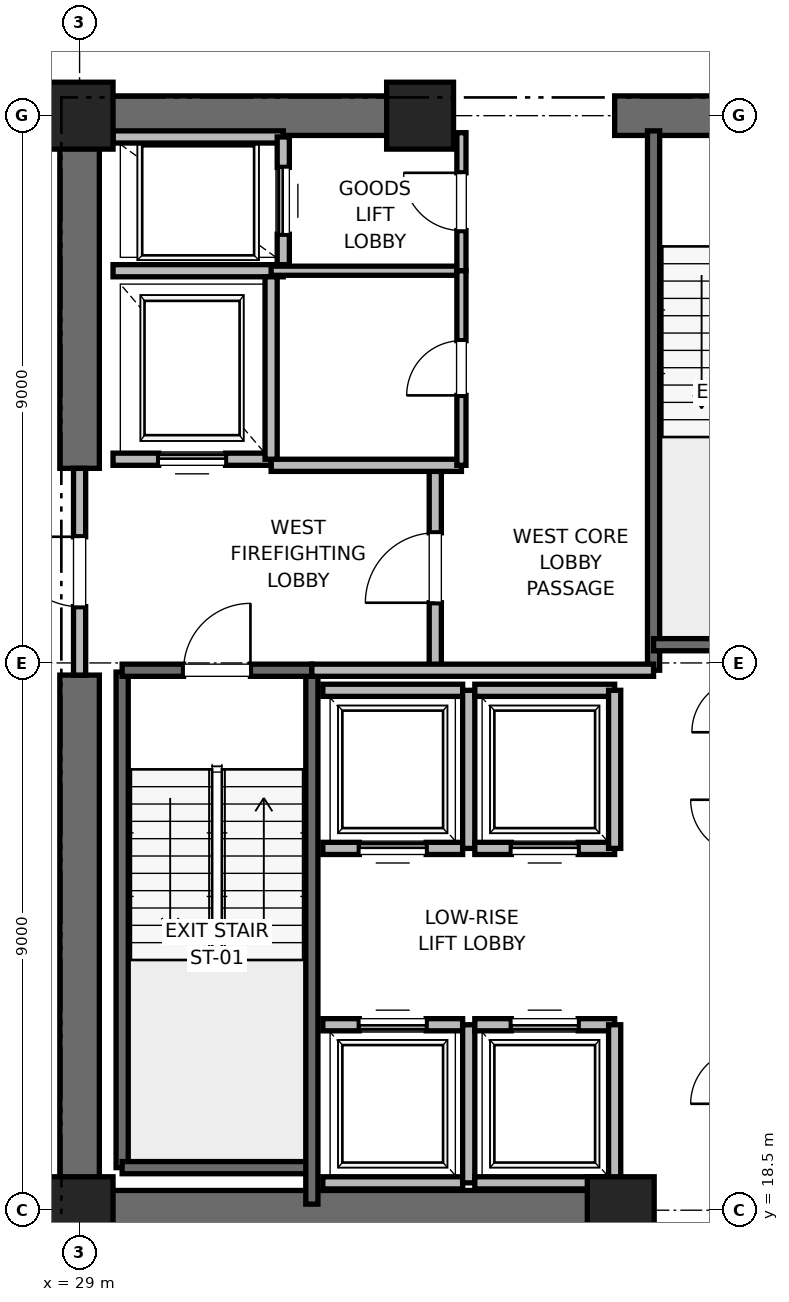
"""IFC4 building model, lengths in metres.
Left out: names, types, materials, properties, quantities, classifications, styles, units other than length and angle.
Written with IfcOpenShell. Run it as: python <this file> out.ifc"""

import sys

from ifc_helpers import new_model, si_unit, direction, frame, frame_2d, origin, origin_2d, place, context, subcontext, project, spatial, rectangle, extrude, element, fill, save


model = new_model("IFC4")
c1 = context("Model", 3, precision=1e-05, world=origin(), true_north=direction((0.0, 1.0)))
c2 = subcontext(c1, "Body", "Model", "MODEL_VIEW")
j1 = project(units=[si_unit("LENGTHUNIT", "METRE"), si_unit("PLANEANGLEUNIT", "RADIAN")], contexts=[c1])
p1 = place(None, origin())
s1 = spatial("IfcSite", under=j1, at=p1, CompositionType="ELEMENT")
p2 = place(p1, origin())
s2 = spatial("IfcBuilding", under=s1, at=p2, CompositionType="ELEMENT")
p3 = place(p2, frame((0.0, 0.0, 91.6)))
s3 = spatial("IfcBuildingStorey", under=s2, at=p3, CompositionType="ELEMENT", Elevation=91.6)
for number, where, z_axis, x_axis in (
    (1, (29.0, 18.5, 0.0), (0.0, 0.0, 1.0), (1.0, 0.0, 0.0)),
    (2, (29.0, 36.5, 0.0), (0.0, 0.0, 1.0), (1.0, 0.0, 0.0)),
    (3, (37.9, 18.5, 0.0), (0.0, 0.0, 1.0), (1.0, 0.0, 0.0)),
    (4, (34.6, 36.5, 0.0), (0.0, 0.0, 1.0), (1.0, 0.0, 0.0)),
):
    element("IfcColumn", number, at=place(p3, frame(where, z_axis=z_axis, x_axis=x_axis)), inside=s3, PredefinedType="PILASTER", context=c2, shape_type="SweptSolid", body=[
        extrude(rectangle(XDim=1.1, YDim=1.1, at=origin_2d()), origin(), (0.0, 0.0, 1.0), 4.0),
    ])
p4 = place(p3, frame((29.0, 18.5, 0.0), z_axis=(0.0, 0.0, 1.0), x_axis=(1.0, 0.0, 0.0)))
e5 = element("IfcWall", 5, at=p4, inside=s3, PredefinedType="SHEAR", context=c2, shape_type="SweptSolid", body=[
    extrude(rectangle(XDim=9.2, YDim=0.65, at=frame_2d((4.6, 0.0))), origin(), (0.0, 0.0, 1.0), 3.76),
])
p5 = place(p3, frame((29.0, 36.5, 0.0), z_axis=(0.0, 0.0, 1.0), x_axis=(1.0, 0.0, 0.0)))
e6 = element("IfcWall", 6, at=p5, inside=s3, PredefinedType="SHEAR", context=c2, shape_type="SweptSolid", body=[
    extrude(rectangle(XDim=5.8, YDim=0.65, at=frame_2d((2.9, 0.0))), origin(), (0.0, 0.0, 1.0), 3.76),
])
p6 = place(p3, frame((37.8, 36.5, 0.0), z_axis=(0.0, 0.0, 1.0), x_axis=(1.0, 0.0, 0.0)))
e7 = element("IfcWall", 7, at=p6, inside=s3, PredefinedType="SHEAR", context=c2, shape_type="SweptSolid", body=[
    extrude(rectangle(XDim=4.4, YDim=0.65, at=frame_2d((2.2, 0.0))), origin(), (0.0, 0.0, 1.0), 3.76),
])
p7 = place(p6, frame((1.65, 0.0, 0.0)))
e8 = element("IfcOpeningElement", 8, at=p7, cuts=e7, PredefinedType="OPENING", context=c2, shape_type="SweptSolid", body=[
    extrude(rectangle(XDim=1.1, YDim=2.15, at=frame_2d((0.55, 1.075))), frame((0.0, 0.325, 0.0), z_axis=(0.0, -1.0, 0.0), x_axis=(1.0, 0.0, 0.0)), (0.0, 0.0, 1.0), 0.65),
])
p8 = place(p3, frame((29.0, 18.5, 0.0), z_axis=(0.0, 0.0, 1.0), x_axis=(0.0, 1.0, 0.0)))
e9 = element("IfcWall", 9, at=p8, inside=s3, PredefinedType="SHEAR", context=c2, shape_type="SweptSolid", body=[
    extrude(rectangle(XDim=8.8, YDim=0.65, at=frame_2d((4.4, 0.0))), origin(), (0.0, 0.0, 1.0), 3.76),
])
p9 = place(p3, frame((29.0, 30.7, 0.0), z_axis=(0.0, 0.0, 1.0), x_axis=(0.0, 1.0, 0.0)))
e10 = element("IfcWall", 10, at=p9, inside=s3, PredefinedType="SHEAR", context=c2, shape_type="SweptSolid", body=[
    extrude(rectangle(XDim=5.8, YDim=0.65, at=frame_2d((2.9, 0.0))), origin(), (0.0, 0.0, 1.0), 3.76),
])
p10 = place(p3, frame((29.7, 19.2, 0.0), z_axis=(0.0, 0.0, 1.0), x_axis=(0.0, 1.0, 0.0)))
e11 = element("IfcWall", 11, at=p10, inside=s3, PredefinedType="SOLIDWALL", context=c2, shape_type="SweptSolid", body=[
    extrude(rectangle(XDim=8.15, YDim=0.2, at=frame_2d((4.075, 0.0))), origin(), (0.0, 0.0, 1.0), 3.76),
])
p11 = place(p3, frame((29.7, 19.2, 0.0), z_axis=(0.0, 0.0, 1.0), x_axis=(1.0, 0.0, 0.0)))
e12 = element("IfcWall", 12, at=p11, inside=s3, PredefinedType="SOLIDWALL", context=c2, shape_type="SweptSolid", body=[
    extrude(rectangle(XDim=3.12, YDim=0.2, at=frame_2d((1.56, 0.0))), origin(), (0.0, 0.0, 1.0), 3.76),
])
p12 = place(p3, frame((32.82, 18.6, 0.0), z_axis=(0.0, 0.0, 1.0), x_axis=(0.0, 1.0, 0.0)))
e13 = element("IfcWall", 13, at=p12, inside=s3, PredefinedType="SOLIDWALL", context=c2, shape_type="SweptSolid", body=[
    extrude(rectangle(XDim=8.78, YDim=0.2, at=frame_2d((4.39, 0.0))), origin(), (0.0, 0.0, 1.0), 3.76),
])
p13 = place(p3, frame((29.7, 27.38, 0.0), z_axis=(0.0, 0.0, 1.0), x_axis=(1.0, 0.0, 0.0)))
e14 = element("IfcWall", 14, at=p13, inside=s3, PredefinedType="SOLIDWALL", context=c2, shape_type="SweptSolid", body=[
    extrude(rectangle(XDim=3.12, YDim=0.2, at=frame_2d((1.56, 0.0))), origin(), (0.0, 0.0, 1.0), 3.76),
])
p14 = place(p13, frame((1.01, 0.0, 0.0)))
e15 = element("IfcOpeningElement", 15, at=p14, cuts=e14, PredefinedType="OPENING", context=c2, shape_type="SweptSolid", body=[
    extrude(rectangle(XDim=1.1, YDim=2.15, at=frame_2d((0.55, 1.075))), frame((0.0, 0.1, 0.0), z_axis=(0.0, -1.0, 0.0), x_axis=(1.0, 0.0, 0.0)), (0.0, 0.0, 1.0), 0.2),
])
p15 = place(p3, frame((38.44, 27.38, 0.0), z_axis=(0.0, 0.0, 1.0), x_axis=(0.0, 1.0, 0.0)))
e16 = element("IfcWall", 16, at=p15, inside=s3, PredefinedType="SOLIDWALL", context=c2, shape_type="SweptSolid", body=[
    extrude(rectangle(XDim=8.87, YDim=0.2, at=frame_2d((4.435, 0.0))), origin(), (0.0, 0.0, 1.0), 3.76),
])
p16 = place(p3, frame((38.44, 27.8, 0.0), z_axis=(0.0, 0.0, 1.0), x_axis=(1.0, 0.0, 0.0)))
e17 = element("IfcWall", 17, at=p16, inside=s3, PredefinedType="SOLIDWALL", context=c2, shape_type="SweptSolid", body=[
    extrude(rectangle(XDim=3.32, YDim=0.2, at=frame_2d((1.66, 0.0))), origin(), (0.0, 0.0, 1.0), 3.76),
])
p17 = place(p3, frame((34.85, 27.38, 0.0), z_axis=(0.0, 0.0, 1.0), x_axis=(0.0, 1.0, 0.0)))
e18 = element("IfcWall", 18, at=p17, inside=s3, PredefinedType="PARTITIONING", context=c2, shape_type="SweptSolid", body=[
    extrude(rectangle(XDim=3.37, YDim=0.2, at=frame_2d((1.685, 0.0))), origin(), (0.0, 0.0, 1.0), 3.76),
])
p18 = place(p17, frame((1.11, 0.0, 0.0)))
e19 = element("IfcOpeningElement", 19, at=p18, cuts=e18, PredefinedType="OPENING", context=c2, shape_type="SweptSolid", body=[
    extrude(rectangle(XDim=1.15, YDim=2.2, at=frame_2d((0.575, 1.1))), frame((0.0, 0.1, 0.0), z_axis=(0.0, -1.0, 0.0), x_axis=(1.0, 0.0, 0.0)), (0.0, 0.0, 1.0), 0.2),
])
p19 = place(p3, frame((29.0, 27.3, 0.0), z_axis=(0.0, 0.0, 1.0), x_axis=(0.0, 1.0, 0.0)))
e20 = element("IfcWall", 20, at=p19, inside=s3, PredefinedType="PARTITIONING", context=c2, shape_type="SweptSolid", body=[
    extrude(rectangle(XDim=3.4, YDim=0.2, at=frame_2d((1.7, 0.0))), origin(), (0.0, 0.0, 1.0), 2.54),
])
p20 = place(p19, frame((1.125, 0.0, 0.0)))
e21 = element("IfcOpeningElement", 21, at=p20, cuts=e20, PredefinedType="OPENING", context=c2, shape_type="SweptSolid", body=[
    extrude(rectangle(XDim=1.15, YDim=2.2, at=frame_2d((0.575, 1.1))), frame((0.0, 0.1, 0.0), z_axis=(0.0, -1.0, 0.0), x_axis=(1.0, 0.0, 0.0)), (0.0, 0.0, 1.0), 0.2),
])
p21 = place(p3, frame((32.82, 27.38, 0.0), z_axis=(0.0, 0.0, 1.0), x_axis=(1.0, 0.0, 0.0)))
e22 = element("IfcWall", 22, at=p21, inside=s3, PredefinedType="PARTITIONING", context=c2, shape_type="SweptSolid", body=[
    extrude(rectangle(XDim=5.62, YDim=0.2, at=frame_2d((2.81, 0.0))), origin(), (0.0, 0.0, 1.0), 3.76),
])
p22 = place(p3, frame((32.15, 30.75, 0.0), z_axis=(0.0, 0.0, 1.0), x_axis=(1.0, 0.0, 0.0)))
e23 = element("IfcWall", 23, at=p22, inside=s3, PredefinedType="PARTITIONING", context=c2, shape_type="SweptSolid", body=[
    extrude(rectangle(XDim=3.13, YDim=0.2, at=frame_2d((1.565, 0.0))), origin(), (0.0, 0.0, 1.0), 3.76),
])
p23 = place(p3, frame((29.55, 30.85, 0.0), z_axis=(0.0, 0.0, 1.0), x_axis=(1.0, 0.0, 0.0)))
e24 = element("IfcWall", 24, at=p23, inside=s3, PredefinedType="SOLIDWALL", context=c2, shape_type="SweptSolid", body=[
    extrude(rectangle(XDim=2.6, YDim=0.2, at=frame_2d((1.3, 0.0))), origin(), (0.0, 0.0, 1.0), 2.54),
])
p24 = place(p23, frame((0.75, 0.0, 0.0)))
e25 = element("IfcOpeningElement", 25, at=p24, cuts=e24, PredefinedType="OPENING", context=c2, shape_type="SweptSolid", body=[
    extrude(rectangle(XDim=1.1, YDim=2.2, at=frame_2d((0.55, 1.1))), frame((0.0, 0.1, 0.0), z_axis=(0.0, -1.0, 0.0), x_axis=(1.0, 0.0, 0.0)), (0.0, 0.0, 1.0), 0.2),
])
p25 = place(p3, frame((29.55, 33.95, 0.0), z_axis=(0.0, 0.0, 1.0), x_axis=(1.0, 0.0, 0.0)))
e26 = element("IfcWall", 26, at=p25, inside=s3, PredefinedType="SOLIDWALL", context=c2, shape_type="SweptSolid", body=[
    extrude(rectangle(XDim=2.8, YDim=0.2, at=frame_2d((1.4, 0.0))), origin(), (0.0, 0.0, 1.0), 3.76),
])
p26 = place(p3, frame((32.15, 30.85, 0.0), z_axis=(0.0, 0.0, 1.0), x_axis=(0.0, 1.0, 0.0)))
e27 = element("IfcWall", 27, at=p26, inside=s3, PredefinedType="SOLIDWALL", context=c2, shape_type="SweptSolid", body=[
    extrude(rectangle(XDim=3.0, YDim=0.2, at=frame_2d((1.5, 0.0))), origin(), (0.0, 0.0, 1.0), 3.76),
])
p27 = place(p3, frame((32.35, 36.15, 0.0), z_axis=(0.0, 0.0, 1.0), x_axis=(-1.0, 0.0, 0.0)))
e28 = element("IfcWall", 28, at=p27, inside=s3, PredefinedType="SOLIDWALL", context=c2, shape_type="SweptSolid", body=[
    extrude(rectangle(XDim=2.8, YDim=0.2, at=frame_2d((1.4, 0.0))), origin(), (0.0, 0.0, 1.0), 2.889),
])
p28 = place(p3, frame((32.35, 34.05, 0.0), z_axis=(0.0, 0.0, 1.0), x_axis=(0.0, 1.0, 0.0)))
e29 = element("IfcWall", 29, at=p28, inside=s3, PredefinedType="SOLIDWALL", context=c2, shape_type="SweptSolid", body=[
    extrude(rectangle(XDim=2.1, YDim=0.2, at=frame_2d((1.05, 0.0))), origin(), (0.0, 0.0, 1.0), 3.76),
])
p29 = place(p28, frame((0.5, 0.0, 0.0)))
e30 = element("IfcOpeningElement", 30, at=p29, cuts=e29, PredefinedType="OPENING", context=c2, shape_type="SweptSolid", body=[
    extrude(rectangle(XDim=1.1, YDim=2.2, at=frame_2d((0.55, 1.1))), frame((0.0, 0.1, 0.0), z_axis=(0.0, -1.0, 0.0), x_axis=(1.0, 0.0, 0.0)), (0.0, 0.0, 1.0), 0.2),
])
p30 = place(p3, frame((33.0, 18.95, 0.0), z_axis=(0.0, 0.0, 1.0), x_axis=(1.0, 0.0, 0.0)))
e31 = element("IfcWall", 31, at=p30, inside=s3, PredefinedType="SOLIDWALL", context=c2, shape_type="SweptSolid", body=[
    extrude(rectangle(XDim=2.3, YDim=0.2, at=frame_2d((1.15, 0.0))), origin(), (0.0, 0.0, 1.0), 3.76),
])
p31 = place(p3, frame((35.3, 21.55, 0.0), z_axis=(0.0, 0.0, 1.0), x_axis=(-1.0, 0.0, 0.0)))
e32 = element("IfcWall", 32, at=p31, inside=s3, PredefinedType="SOLIDWALL", context=c2, shape_type="SweptSolid", body=[
    extrude(rectangle(XDim=2.3, YDim=0.2, at=frame_2d((1.15, 0.0))), origin(), (0.0, 0.0, 1.0), 3.76),
])
p32 = place(p31, frame((0.6, 0.0, 0.0)))
e33 = element("IfcOpeningElement", 33, at=p32, cuts=e32, PredefinedType="OPENING", context=c2, shape_type="SweptSolid", body=[
    extrude(rectangle(XDim=1.1, YDim=2.2, at=frame_2d((0.55, 1.1))), frame((0.0, 0.1, 0.0), z_axis=(0.0, -1.0, 0.0), x_axis=(1.0, 0.0, 0.0)), (0.0, 0.0, 1.0), 0.2),
])
p33 = place(p3, frame((35.4, 18.95, 0.0), z_axis=(0.0, 0.0, 1.0), x_axis=(0.0, 1.0, 0.0)))
e34 = element("IfcWall", 34, at=p33, inside=s3, PredefinedType="SOLIDWALL", context=c2, shape_type="SweptSolid", body=[
    extrude(rectangle(XDim=2.6, YDim=0.2, at=frame_2d((1.3, 0.0))), origin(), (0.0, 0.0, 1.0), 3.76),
])
p34 = place(p3, frame((35.5, 18.95, 0.0), z_axis=(0.0, 0.0, 1.0), x_axis=(1.0, 0.0, 0.0)))
e35 = element("IfcWall", 35, at=p34, inside=s3, PredefinedType="SOLIDWALL", context=c2, shape_type="SweptSolid", body=[
    extrude(rectangle(XDim=2.3, YDim=0.2, at=frame_2d((1.15, 0.0))), origin(), (0.0, 0.0, 1.0), 2.54),
])
p35 = place(p3, frame((37.8, 21.55, 0.0), z_axis=(0.0, 0.0, 1.0), x_axis=(-1.0, 0.0, 0.0)))
e36 = element("IfcWall", 36, at=p35, inside=s3, PredefinedType="SOLIDWALL", context=c2, shape_type="SweptSolid", body=[
    extrude(rectangle(XDim=2.3, YDim=0.2, at=frame_2d((1.15, 0.0))), origin(), (0.0, 0.0, 1.0), 3.76),
])
p36 = place(p35, frame((0.6, 0.0, 0.0)))
e37 = element("IfcOpeningElement", 37, at=p36, cuts=e36, PredefinedType="OPENING", context=c2, shape_type="SweptSolid", body=[
    extrude(rectangle(XDim=1.1, YDim=2.2, at=frame_2d((0.55, 1.1))), frame((0.0, 0.1, 0.0), z_axis=(0.0, -1.0, 0.0), x_axis=(1.0, 0.0, 0.0)), (0.0, 0.0, 1.0), 0.2),
])
p37 = place(p3, frame((37.8, 18.95, 0.0), z_axis=(0.0, 0.0, 1.0), x_axis=(0.0, 1.0, 0.0)))
e38 = element("IfcWall", 38, at=p37, inside=s3, PredefinedType="SOLIDWALL", context=c2, shape_type="SweptSolid", body=[
    extrude(rectangle(XDim=2.6, YDim=0.2, at=frame_2d((1.3, 0.0))), origin(), (0.0, 0.0, 1.0), 2.54),
])
p38 = place(p3, frame((33.0, 24.45, 0.0), z_axis=(0.0, 0.0, 1.0), x_axis=(1.0, 0.0, 0.0)))
e39 = element("IfcWall", 39, at=p38, inside=s3, PredefinedType="SOLIDWALL", context=c2, shape_type="SweptSolid", body=[
    extrude(rectangle(XDim=2.3, YDim=0.2, at=frame_2d((1.15, 0.0))), origin(), (0.0, 0.0, 1.0), 3.76),
])
p39 = place(p38, frame((0.6, 0.0, 0.0)))
e40 = element("IfcOpeningElement", 40, at=p39, cuts=e39, PredefinedType="OPENING", context=c2, shape_type="SweptSolid", body=[
    extrude(rectangle(XDim=1.1, YDim=2.2, at=frame_2d((0.55, 1.1))), frame((0.0, 0.1, 0.0), z_axis=(0.0, -1.0, 0.0), x_axis=(1.0, 0.0, 0.0)), (0.0, 0.0, 1.0), 0.2),
])
p40 = place(p3, frame((35.3, 27.05, 0.0), z_axis=(0.0, 0.0, 1.0), x_axis=(-1.0, 0.0, 0.0)))
e41 = element("IfcWall", 41, at=p40, inside=s3, PredefinedType="SOLIDWALL", context=c2, shape_type="SweptSolid", body=[
    extrude(rectangle(XDim=2.3, YDim=0.2, at=frame_2d((1.15, 0.0))), origin(), (0.0, 0.0, 1.0), 3.76),
])
p41 = place(p3, frame((35.4, 24.45, 0.0), z_axis=(0.0, 0.0, 1.0), x_axis=(0.0, 1.0, 0.0)))
e42 = element("IfcWall", 42, at=p41, inside=s3, PredefinedType="SOLIDWALL", context=c2, shape_type="SweptSolid", body=[
    extrude(rectangle(XDim=2.6, YDim=0.2, at=frame_2d((1.3, 0.0))), origin(), (0.0, 0.0, 1.0), 3.76),
])
p42 = place(p3, frame((35.5, 24.45, 0.0), z_axis=(0.0, 0.0, 1.0), x_axis=(1.0, 0.0, 0.0)))
e43 = element("IfcWall", 43, at=p42, inside=s3, PredefinedType="SOLIDWALL", context=c2, shape_type="SweptSolid", body=[
    extrude(rectangle(XDim=2.3, YDim=0.2, at=frame_2d((1.15, 0.0))), origin(), (0.0, 0.0, 1.0), 3.76),
])
p43 = place(p42, frame((0.6, 0.0, 0.0)))
e44 = element("IfcOpeningElement", 44, at=p43, cuts=e43, PredefinedType="OPENING", context=c2, shape_type="SweptSolid", body=[
    extrude(rectangle(XDim=1.1, YDim=2.2, at=frame_2d((0.55, 1.1))), frame((0.0, 0.1, 0.0), z_axis=(0.0, -1.0, 0.0), x_axis=(1.0, 0.0, 0.0)), (0.0, 0.0, 1.0), 0.2),
])
p44 = place(p3, frame((37.8, 27.05, 0.0), z_axis=(0.0, 0.0, 1.0), x_axis=(-1.0, 0.0, 0.0)))
e45 = element("IfcWall", 45, at=p44, inside=s3, PredefinedType="SOLIDWALL", context=c2, shape_type="SweptSolid", body=[
    extrude(rectangle(XDim=2.3, YDim=0.2, at=frame_2d((1.15, 0.0))), origin(), (0.0, 0.0, 1.0), 3.76),
])
p45 = place(p3, frame((37.8, 24.45, 0.0), z_axis=(0.0, 0.0, 1.0), x_axis=(0.0, 1.0, 0.0)))
e46 = element("IfcWall", 46, at=p45, inside=s3, PredefinedType="SOLIDWALL", context=c2, shape_type="SweptSolid", body=[
    extrude(rectangle(XDim=2.6, YDim=0.2, at=frame_2d((1.3, 0.0))), origin(), (0.0, 0.0, 1.0), 3.76),
])
p46 = place(p3, frame((32.15, 33.95, 0.0), z_axis=(0.0, 0.0, 1.0), x_axis=(1.0, 0.0, 0.0)))
e47 = element("IfcWall", 47, at=p46, inside=s3, PredefinedType="PARTITIONING", context=c2, shape_type="SweptSolid", body=[
    extrude(rectangle(XDim=3.13, YDim=0.15, at=frame_2d((1.565, 0.0))), origin(), (0.0, 0.0, 1.0), 2.85),
])
p47 = place(p3, frame((35.28, 33.95, 0.0), z_axis=(0.0, 0.0, 1.0), x_axis=(0.0, 1.0, 0.0)))
e48 = element("IfcWall", 48, at=p47, inside=s3, PredefinedType="PARTITIONING", context=c2, shape_type="SweptSolid", body=[
    extrude(rectangle(XDim=2.27, YDim=0.15, at=frame_2d((1.135, 0.0))), origin(), (0.0, 0.0, 1.0), 2.54),
])
p48 = place(p47, frame((0.66, 0.0, 0.0)))
e49 = element("IfcOpeningElement", 49, at=p48, cuts=e48, PredefinedType="OPENING", context=c2, shape_type="SweptSolid", body=[
    extrude(rectangle(XDim=0.95, YDim=2.15, at=frame_2d((0.475, 1.075))), frame((0.0, 0.075, 0.0), z_axis=(0.0, -1.0, 0.0), x_axis=(1.0, 0.0, 0.0)), (0.0, 0.0, 1.0), 0.15),
])
p49 = place(p3, frame((35.28, 30.75, 0.0), z_axis=(0.0, 0.0, 1.0), x_axis=(0.0, 1.0, 0.0)))
e50 = element("IfcWall", 50, at=p49, inside=s3, PredefinedType="PARTITIONING", context=c2, shape_type="SweptSolid", body=[
    extrude(rectangle(XDim=3.2, YDim=0.15, at=frame_2d((1.6, 0.0))), origin(), (0.0, 0.0, 1.0), 2.85),
])
p50 = place(p49, frame((1.15, 0.0, 0.0)))
e51 = element("IfcOpeningElement", 51, at=p50, cuts=e50, PredefinedType="OPENING", context=c2, shape_type="SweptSolid", body=[
    extrude(rectangle(XDim=0.9, YDim=2.1, at=frame_2d((0.45, 1.05))), frame((0.0, 0.075, 0.0), z_axis=(0.0, -1.0, 0.0), x_axis=(1.0, 0.0, 0.0)), (0.0, 0.0, 1.0), 0.15),
])
p51 = place(p14, origin())
e52 = element("IfcDoor", 52, at=p51, inside=s3, OperationType="SINGLE_SWING_RIGHT", PredefinedType="DOOR", context=c2, shape_type="SweptSolid", body=[
    extrude(rectangle(XDim=1.1, YDim=2.15, at=frame_2d((0.55, 1.075))), frame((0.0, 0.025, 0.0), z_axis=(0.0, -1.0, 0.0), x_axis=(1.0, 0.0, 0.0)), (0.0, 0.0, 1.0), 0.05),
])
fill(e15, e52)
p52 = place(p18, origin())
e53 = element("IfcDoor", 53, at=p52, inside=s3, OperationType="SINGLE_SWING_LEFT", PredefinedType="DOOR", context=c2, shape_type="SweptSolid", body=[
    extrude(rectangle(XDim=1.15, YDim=2.2, at=frame_2d((0.575, 1.1))), frame((0.0, 0.025, 0.0), z_axis=(0.0, -1.0, 0.0), x_axis=(1.0, 0.0, 0.0)), (0.0, 0.0, 1.0), 0.05),
])
fill(e19, e53)
p53 = place(p20, origin())
e54 = element("IfcDoor", 54, at=p53, inside=s3, OperationType="SINGLE_SWING_RIGHT", PredefinedType="DOOR", context=c2, shape_type="SweptSolid", body=[
    extrude(rectangle(XDim=1.15, YDim=2.2, at=frame_2d((0.575, 1.1))), frame((0.0, 0.025, 0.0), z_axis=(0.0, -1.0, 0.0), x_axis=(1.0, 0.0, 0.0)), (0.0, 0.0, 1.0), 0.05),
])
fill(e21, e54)
p54 = place(p24, origin())
e55 = element("IfcDoor", 55, at=p54, inside=s3, OperationType="SLIDING_TO_RIGHT", PredefinedType="DOOR", context=c2, shape_type="SweptSolid", body=[
    extrude(rectangle(XDim=1.1, YDim=2.2, at=frame_2d((0.55, 1.1))), frame((0.0, 0.025, 0.0), z_axis=(0.0, -1.0, 0.0), x_axis=(1.0, 0.0, 0.0)), (0.0, 0.0, 1.0), 0.05),
])
fill(e25, e55)
p55 = place(p29, origin())
e56 = element("IfcDoor", 56, at=p55, inside=s3, OperationType="SLIDING_TO_RIGHT", PredefinedType="DOOR", context=c2, shape_type="SweptSolid", body=[
    extrude(rectangle(XDim=1.1, YDim=2.2, at=frame_2d((0.55, 1.1))), frame((0.0, 0.025, 0.0), z_axis=(0.0, -1.0, 0.0), x_axis=(1.0, 0.0, 0.0)), (0.0, 0.0, 1.0), 0.05),
])
fill(e30, e56)
p56 = place(p32, origin())
e57 = element("IfcDoor", 57, at=p56, inside=s3, OperationType="SLIDING_TO_RIGHT", PredefinedType="DOOR", context=c2, shape_type="SweptSolid", body=[
    extrude(rectangle(XDim=1.1, YDim=2.2, at=frame_2d((0.55, 1.1))), frame((0.0, 0.025, 0.0), z_axis=(0.0, -1.0, 0.0), x_axis=(1.0, 0.0, 0.0)), (0.0, 0.0, 1.0), 0.05),
])
fill(e33, e57)
p57 = place(p36, origin())
e58 = element("IfcDoor", 58, at=p57, inside=s3, OperationType="SLIDING_TO_RIGHT", PredefinedType="DOOR", context=c2, shape_type="SweptSolid", body=[
    extrude(rectangle(XDim=1.1, YDim=2.2, at=frame_2d((0.55, 1.1))), frame((0.0, 0.025, 0.0), z_axis=(0.0, -1.0, 0.0), x_axis=(1.0, 0.0, 0.0)), (0.0, 0.0, 1.0), 0.05),
])
fill(e37, e58)
p58 = place(p39, origin())
e59 = element("IfcDoor", 59, at=p58, inside=s3, OperationType="SLIDING_TO_RIGHT", PredefinedType="DOOR", context=c2, shape_type="SweptSolid", body=[
    extrude(rectangle(XDim=1.1, YDim=2.2, at=frame_2d((0.55, 1.1))), frame((0.0, 0.025, 0.0), z_axis=(0.0, -1.0, 0.0), x_axis=(1.0, 0.0, 0.0)), (0.0, 0.0, 1.0), 0.05),
])
fill(e40, e59)
p59 = place(p43, origin())
e60 = element("IfcDoor", 60, at=p59, inside=s3, OperationType="SLIDING_TO_RIGHT", PredefinedType="DOOR", context=c2, shape_type="SweptSolid", body=[
    extrude(rectangle(XDim=1.1, YDim=2.2, at=frame_2d((0.55, 1.1))), frame((0.0, 0.025, 0.0), z_axis=(0.0, -1.0, 0.0), x_axis=(1.0, 0.0, 0.0)), (0.0, 0.0, 1.0), 0.05),
])
fill(e44, e60)
p60 = place(p48, origin())
e61 = element("IfcDoor", 61, at=p60, inside=s3, OperationType="SINGLE_SWING_RIGHT", PredefinedType="DOOR", context=c2, shape_type="SweptSolid", body=[
    extrude(rectangle(XDim=0.95, YDim=2.15, at=frame_2d((0.475, 1.075))), frame((0.0, 0.025, 0.0), z_axis=(0.0, -1.0, 0.0), x_axis=(1.0, 0.0, 0.0)), (0.0, 0.0, 1.0), 0.05),
])
fill(e49, e61)
p61 = place(p50, origin())
e62 = element("IfcDoor", 62, at=p61, inside=s3, OperationType="SINGLE_SWING_LEFT", PredefinedType="DOOR", context=c2, shape_type="SweptSolid", body=[
    extrude(rectangle(XDim=0.9, YDim=2.1, at=frame_2d((0.45, 1.05))), frame((0.0, 0.025, 0.0), z_axis=(0.0, -1.0, 0.0), x_axis=(1.0, 0.0, 0.0)), (0.0, 0.0, 1.0), 0.05),
])
fill(e51, e62)
save(model, sys.argv[1])
